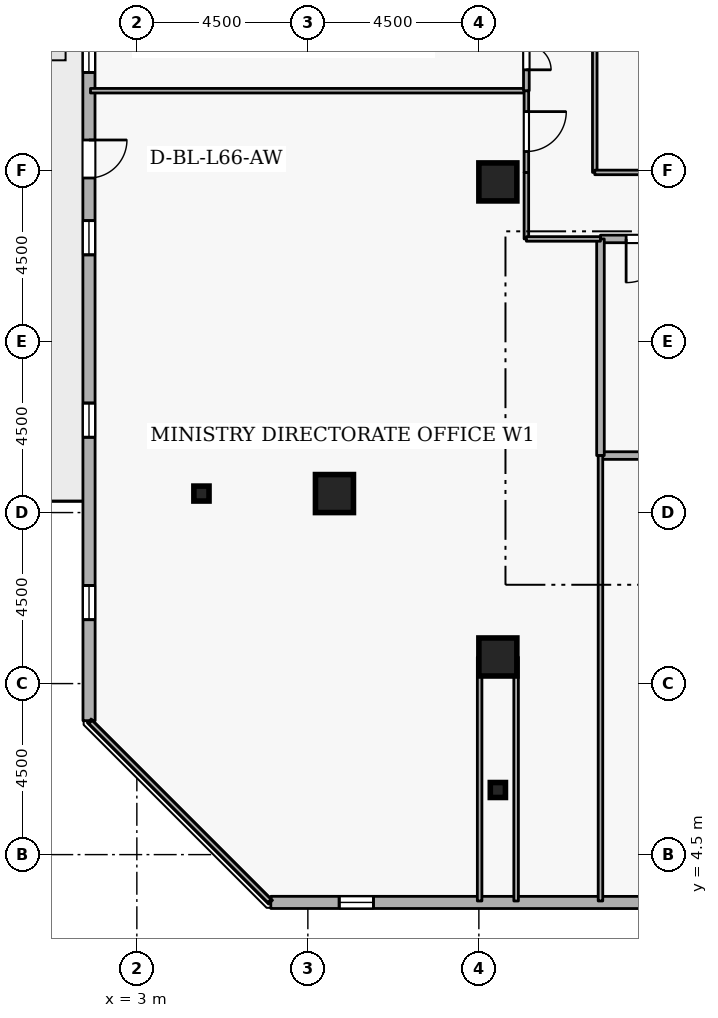
"""IFC4 building model, lengths in metres.
Left out: names, types, materials, properties, quantities, classifications, styles, units other than length and angle.
Written with IfcOpenShell. Run it as: python <this file> out.ifc"""

import sys

from ifc_helpers import new_model, si_unit, direction, frame, frame_2d, origin, origin_2d, place, context, subcontext, project, spatial, rectangle, i_section, extrude, element, fill, save


model = new_model("IFC4")
c1 = context("Model", 3, precision=1e-05, world=origin(), true_north=direction((0.0, 1.0)))
c2 = subcontext(c1, "Body", "Model", "MODEL_VIEW")
j1 = project(units=[si_unit("LENGTHUNIT", "METRE"), si_unit("PLANEANGLEUNIT", "RADIAN")], contexts=[c1])
p1 = place(None, origin())
s1 = spatial("IfcSite", under=j1, at=p1, CompositionType="ELEMENT")
p2 = place(p1, origin())
s2 = spatial("IfcBuilding", under=s1, at=p2, CompositionType="ELEMENT")
p3 = place(p2, frame((0.0, 0.0, 247.5)))
s3 = spatial("IfcBuildingStorey", under=s2, at=p3, CompositionType="ELEMENT", Elevation=247.5)
for number, where, z_axis, x_axis in (
    (1, (12.5, 9.7, 0.0), (0.0, 0.0, 1.0), (1.0, 0.0, 0.0)),
    (2, (8.2, 14.0, 0.0), (0.0, 0.0, 1.0), (1.0, 0.0, 0.0)),
    (3, (12.5, 22.2, 0.0), (0.0, 0.0, 1.0), (1.0, 0.0, 0.0)),
):
    element("IfcColumn", number, at=place(p3, frame(where, z_axis=z_axis, x_axis=x_axis)), inside=s3, PredefinedType="COLUMN", context=c2, shape_type="SweptSolid", body=[
        extrude(rectangle(XDim=1.0, YDim=1.0, at=origin_2d()), origin(), (0.0, 0.0, 1.0), 3.6),
    ])
for number, where, z_axis, x_axis in (
    (4, (12.5, 6.2, 0.0), (0.0, 0.0, 1.0), (1.0, 0.0, 0.0)),
    (5, (4.7, 14.0, 0.0), (0.0, 0.0, 1.0), (1.0, 0.0, 0.0)),
):
    element("IfcColumn", number, at=place(p3, frame(where, z_axis=z_axis, x_axis=x_axis)), inside=s3, PredefinedType="COLUMN", context=c2, shape_type="SweptSolid", body=[
        extrude(i_section(OverallWidth=0.399, OverallDepth=0.394, WebThickness=0.023, FlangeThickness=0.037, FilletRadius=0.015, at=origin_2d()), origin(), (0.0, 0.0, 1.0), 3.6),
    ])
p4 = place(p3, frame((6.525, 3.243, 0.0), z_axis=(0.0, 0.0, 1.0), x_axis=(0.99999997701, -0.000214431216, 0.0)))
e6 = element("IfcWall", 6, at=p4, inside=s3, PredefinedType="STANDARD", context=c2, shape_type="SweptSolid", body=[
    extrude(rectangle(XDim=34.156, YDim=0.32, at=frame_2d((17.078, 0.0))), origin(), (0.0, 0.0, 1.0), 2.7),
])
p5 = place(p4, frame((1.8, 0.0, 0.72)))
e7 = element("IfcOpeningElement", 7, at=p5, cuts=e6, PredefinedType="OPENING", context=c2, shape_type="SweptSolid", body=[
    extrude(rectangle(XDim=0.9, YDim=1.75, at=frame_2d((0.45, 0.875))), frame((0.0, 0.17, 0.0), z_axis=(0.0, -1.0, 0.0), x_axis=(1.0, 0.0, 0.0)), (0.0, 0.0, 1.0), 0.34),
])
p6 = place(p4, frame((11.4, 0.0, 0.72)))
e8 = element("IfcOpeningElement", 8, at=p6, cuts=e6, PredefinedType="OPENING", context=c2, shape_type="SweptSolid", body=[
    extrude(rectangle(XDim=0.9, YDim=1.75, at=frame_2d((0.45, 0.875))), frame((0.0, 0.17, 0.0), z_axis=(0.0, -1.0, 0.0), x_axis=(1.0, 0.0, 0.0)), (0.0, 0.0, 1.0), 0.34),
])
p7 = place(p4, frame((16.2, 0.0, 0.72)))
e9 = element("IfcOpeningElement", 9, at=p7, cuts=e6, PredefinedType="OPENING", context=c2, shape_type="SweptSolid", body=[
    extrude(rectangle(XDim=0.9, YDim=1.75, at=frame_2d((0.45, 0.875))), frame((0.0, 0.17, 0.0), z_axis=(0.0, -1.0, 0.0), x_axis=(1.0, 0.0, 0.0)), (0.0, 0.0, 1.0), 0.34),
])
p8 = place(p4, frame((21.0, 0.0, 0.72)))
e10 = element("IfcOpeningElement", 10, at=p8, cuts=e6, PredefinedType="OPENING", context=c2, shape_type="SweptSolid", body=[
    extrude(rectangle(XDim=0.9, YDim=1.75, at=frame_2d((0.45, 0.875))), frame((0.0, 0.17, 0.0), z_axis=(0.0, -1.0, 0.0), x_axis=(1.0, 0.0, 0.0)), (0.0, 0.0, 1.0), 0.34),
])
p9 = place(p3, frame((1.735, 42.181, 0.0), z_axis=(0.0, 0.0, 1.0), x_axis=(0.000214431216, -0.99999997701, 0.0)))
e11 = element("IfcWall", 11, at=p9, inside=s3, PredefinedType="STANDARD", context=c2, shape_type="SweptSolid", body=[
    extrude(rectangle(XDim=34.156, YDim=0.32, at=frame_2d((17.078, 0.0))), origin(), (0.0, 0.0, 1.0), 2.7),
])
p10 = place(p9, frame((18.878, 0.0, 0.0)))
e12 = element("IfcOpeningElement", 12, at=p10, cuts=e11, PredefinedType="OPENING", context=c2, shape_type="SweptSolid", body=[
    extrude(rectangle(XDim=1.0, YDim=2.08, at=frame_2d((0.5, 1.04))), frame((0.0, 0.17, 0.0), z_axis=(0.0, -1.0, 0.0), x_axis=(1.0, 0.0, 0.0)), (0.0, 0.0, 1.0), 0.34),
])
p11 = place(p9, frame((1.8, 0.0, 0.72)))
e13 = element("IfcOpeningElement", 13, at=p11, cuts=e11, PredefinedType="OPENING", context=c2, shape_type="SweptSolid", body=[
    extrude(rectangle(XDim=0.9, YDim=1.75, at=frame_2d((0.45, 0.875))), frame((0.0, 0.17, 0.0), z_axis=(0.0, -1.0, 0.0), x_axis=(1.0, 0.0, 0.0)), (0.0, 0.0, 1.0), 0.34),
])
p12 = place(p9, frame((6.6, 0.0, 0.72)))
e14 = element("IfcOpeningElement", 14, at=p12, cuts=e11, PredefinedType="OPENING", context=c2, shape_type="SweptSolid", body=[
    extrude(rectangle(XDim=0.9, YDim=1.75, at=frame_2d((0.45, 0.875))), frame((0.0, 0.17, 0.0), z_axis=(0.0, -1.0, 0.0), x_axis=(1.0, 0.0, 0.0)), (0.0, 0.0, 1.0), 0.34),
])
p13 = place(p9, frame((11.4, 0.0, 0.72)))
e15 = element("IfcOpeningElement", 15, at=p13, cuts=e11, PredefinedType="OPENING", context=c2, shape_type="SweptSolid", body=[
    extrude(rectangle(XDim=0.9, YDim=1.75, at=frame_2d((0.45, 0.875))), frame((0.0, 0.17, 0.0), z_axis=(0.0, -1.0, 0.0), x_axis=(1.0, 0.0, 0.0)), (0.0, 0.0, 1.0), 0.34),
])
p14 = place(p9, frame((16.2, 0.0, 0.72)))
e16 = element("IfcOpeningElement", 16, at=p14, cuts=e11, PredefinedType="OPENING", context=c2, shape_type="SweptSolid", body=[
    extrude(rectangle(XDim=0.9, YDim=1.75, at=frame_2d((0.45, 0.875))), frame((0.0, 0.17, 0.0), z_axis=(0.0, -1.0, 0.0), x_axis=(1.0, 0.0, 0.0)), (0.0, 0.0, 1.0), 0.34),
])
p15 = place(p9, frame((21.0, 0.0, 0.72)))
e17 = element("IfcOpeningElement", 17, at=p15, cuts=e11, PredefinedType="OPENING", context=c2, shape_type="SweptSolid", body=[
    extrude(rectangle(XDim=0.9, YDim=1.75, at=frame_2d((0.45, 0.875))), frame((0.0, 0.17, 0.0), z_axis=(0.0, -1.0, 0.0), x_axis=(1.0, 0.0, 0.0)), (0.0, 0.0, 1.0), 0.34),
])
p16 = place(p9, frame((25.8, 0.0, 0.72)))
e18 = element("IfcOpeningElement", 18, at=p16, cuts=e11, PredefinedType="OPENING", context=c2, shape_type="SweptSolid", body=[
    extrude(rectangle(XDim=0.9, YDim=1.75, at=frame_2d((0.45, 0.875))), frame((0.0, 0.17, 0.0), z_axis=(0.0, -1.0, 0.0), x_axis=(1.0, 0.0, 0.0)), (0.0, 0.0, 1.0), 0.34),
])
p17 = place(p9, frame((30.6, 0.0, 0.72)))
e19 = element("IfcOpeningElement", 19, at=p17, cuts=e11, PredefinedType="OPENING", context=c2, shape_type="SweptSolid", body=[
    extrude(rectangle(XDim=0.9, YDim=1.75, at=frame_2d((0.45, 0.875))), frame((0.0, 0.17, 0.0), z_axis=(0.0, -1.0, 0.0), x_axis=(1.0, 0.0, 0.0)), (0.0, 0.0, 1.0), 0.34),
])
p18 = place(p3, frame((15.2, 15.0, 0.0), z_axis=(0.0, 0.0, 1.0), x_axis=(1.0, 0.0, 0.0)))
e20 = element("IfcWall", 20, at=p18, inside=s3, PredefinedType="STANDARD", context=c2, shape_type="SweptSolid", body=[
    extrude(rectangle(XDim=2.5, YDim=0.2, at=frame_2d((1.25, 0.0))), origin(), (0.0, 0.0, 1.0), 3.34),
])
p19 = place(p3, frame((17.7, 20.7, 0.0), z_axis=(0.0, 0.0, 1.0), x_axis=(-1.0, 0.0, 0.0)))
e21 = element("IfcWall", 21, at=p19, inside=s3, PredefinedType="STANDARD", context=c2, shape_type="SweptSolid", body=[
    extrude(rectangle(XDim=2.5, YDim=0.2, at=frame_2d((1.25, 0.0))), origin(), (0.0, 0.0, 1.0), 3.34),
])
p20 = place(p19, frame((0.675, 0.0, 0.0)))
e22 = element("IfcOpeningElement", 22, at=p20, cuts=e21, PredefinedType="OPENING", context=c2, shape_type="SweptSolid", body=[
    extrude(rectangle(XDim=1.15, YDim=2.1, at=frame_2d((0.575, 1.05))), frame((0.0, 0.11, 0.0), z_axis=(0.0, -1.0, 0.0), x_axis=(1.0, 0.0, 0.0)), (0.0, 0.0, 1.0), 0.22),
])
p21 = place(p3, frame((15.2, 20.7, 0.0), z_axis=(0.0, 0.0, 1.0), x_axis=(0.0, -1.0, 0.0)))
e23 = element("IfcWall", 23, at=p21, inside=s3, PredefinedType="STANDARD", context=c2, shape_type="SweptSolid", body=[
    extrude(rectangle(XDim=5.7, YDim=0.2, at=frame_2d((2.85, 0.0))), origin(), (0.0, 0.0, 1.0), 3.34),
])
p22 = place(p3, frame((13.25, 22.45, 0.0), z_axis=(0.0, 0.0, 1.0), x_axis=(0.0, -1.0, 0.0)))
e24 = element("IfcWall", 24, at=p22, inside=s3, PredefinedType="PARTITIONING", context=c2, shape_type="SweptSolid", body=[
    extrude(rectangle(XDim=1.75, YDim=0.12, at=frame_2d((0.875, 0.0))), origin(), (0.0, 0.0, 1.0), 3.34),
])
p23 = place(p3, frame((13.25, 20.7, 0.0), z_axis=(0.0, 0.0, 1.0), x_axis=(1.0, 0.0, 0.0)))
e25 = element("IfcWall", 25, at=p23, inside=s3, PredefinedType="PARTITIONING", context=c2, shape_type="SweptSolid", body=[
    extrude(rectangle(XDim=1.95, YDim=0.12, at=frame_2d((0.975, 0.0))), origin(), (0.0, 0.0, 1.0), 3.34),
])
p24 = place(p3, frame((15.2, 15.0, 0.0), z_axis=(0.0, 0.0, 1.0), x_axis=(0.0, -1.0, 0.0)))
e26 = element("IfcWall", 26, at=p24, inside=s3, PredefinedType="PARTITIONING", context=c2, shape_type="SweptSolid", body=[
    extrude(rectangle(XDim=11.72, YDim=0.12, at=frame_2d((5.86, 0.0))), origin(), (0.0, 0.0, 1.0), 3.34),
])
p25 = place(p3, frame((12.98, 3.28, 0.0), z_axis=(0.0, 0.0, 1.0), x_axis=(0.0, 1.0, 0.0)))
e27 = element("IfcWall", 27, at=p25, inside=s3, PredefinedType="PARTITIONING", context=c2, shape_type="SweptSolid", body=[
    extrude(rectangle(XDim=6.42, YDim=0.12, at=frame_2d((3.21, 0.0))), origin(), (0.0, 0.0, 1.0), 3.34),
])
p26 = place(p3, frame((12.02, 9.7, 0.0), z_axis=(0.0, 0.0, 1.0), x_axis=(0.0, -1.0, 0.0)))
e28 = element("IfcWall", 28, at=p26, inside=s3, PredefinedType="PARTITIONING", context=c2, shape_type="SweptSolid", body=[
    extrude(rectangle(XDim=6.42, YDim=0.12, at=frame_2d((3.21, 0.0))), origin(), (0.0, 0.0, 1.0), 2.895),
])
p27 = place(p3, frame((6.49, 3.28, 0.0), z_axis=(0.0, 0.0, 1.0), x_axis=(-0.707106781187, 0.707106781187, 0.0)))
e29 = element("IfcWall", 29, at=p27, inside=s3, PredefinedType="PARTITIONING", context=c2, shape_type="SweptSolid", body=[
    extrude(rectangle(XDim=6.66, YDim=0.12, at=frame_2d((3.33, 0.0))), origin(), (0.0, 0.0, 1.0), 3.34),
])
p28 = place(p3, frame((1.78, 24.6, 0.0), z_axis=(0.0, 0.0, 1.0), x_axis=(1.0, 0.0, 0.0)))
e30 = element("IfcWall", 30, at=p28, inside=s3, PredefinedType="PARTITIONING", context=c2, shape_type="SweptSolid", body=[
    extrude(rectangle(XDim=11.47, YDim=0.12, at=frame_2d((5.735, 0.0))), origin(), (0.0, 0.0, 1.0), 3.34),
])
p29 = place(p3, frame((13.25, 24.6, 0.0), z_axis=(0.0, 0.0, 1.0), x_axis=(0.0, -1.0, 0.0)))
e31 = element("IfcWall", 31, at=p29, inside=s3, PredefinedType="PARTITIONING", context=c2, shape_type="SweptSolid", body=[
    extrude(rectangle(XDim=2.15, YDim=0.12, at=frame_2d((1.075, 0.0))), origin(), (0.0, 0.0, 1.0), 3.34),
])
p30 = place(p29, frame((0.55, 0.0, 0.0)))
e32 = element("IfcOpeningElement", 32, at=p30, cuts=e31, PredefinedType="OPENING", context=c2, shape_type="SweptSolid", body=[
    extrude(rectangle(XDim=1.05, YDim=2.1, at=frame_2d((0.525, 1.05))), frame((0.0, 0.07, 0.0), z_axis=(0.0, -1.0, 0.0), x_axis=(1.0, 0.0, 0.0)), (0.0, 0.0, 1.0), 0.14),
])
p31 = place(p3, frame((13.25, 27.0, 0.0), z_axis=(0.0, 0.0, 1.0), x_axis=(0.0, -1.0, 0.0)))
e33 = element("IfcWall", 33, at=p31, inside=s3, PredefinedType="PARTITIONING", context=c2, shape_type="SweptSolid", body=[
    extrude(rectangle(XDim=2.4, YDim=0.15, at=frame_2d((1.2, 0.0))), origin(), (0.0, 0.0, 1.0), 3.34),
])
p32 = place(p31, frame((0.55, 0.0, 0.0)))
e34 = element("IfcOpeningElement", 34, at=p32, cuts=e33, PredefinedType="OPENING", context=c2, shape_type="SweptSolid", body=[
    extrude(rectangle(XDim=1.3, YDim=2.12, at=frame_2d((0.65, 1.06))), frame((0.0, 0.085, 0.0), z_axis=(0.0, -1.0, 0.0), x_axis=(1.0, 0.0, 0.0)), (0.0, 0.0, 1.0), 0.17),
])
p33 = place(p3, frame((15.05, 22.45, 0.0), z_axis=(0.0, 0.0, 1.0), x_axis=(0.0, 1.0, 0.0)))
e35 = element("IfcWall", 35, at=p33, inside=s3, PredefinedType="PARTITIONING", context=c2, shape_type="SweptSolid", body=[
    extrude(rectangle(XDim=3.75, YDim=0.12, at=frame_2d((1.875, 0.0))), origin(), (0.0, 0.0, 1.0), 3.34),
])
p34 = place(p3, frame((20.9, 22.45, 0.0), z_axis=(0.0, 0.0, 1.0), x_axis=(-1.0, 0.0, 0.0)))
e36 = element("IfcWall", 36, at=p34, inside=s3, PredefinedType="PARTITIONING", context=c2, shape_type="SweptSolid", body=[
    extrude(rectangle(XDim=5.85, YDim=0.12, at=frame_2d((2.925, 0.0))), origin(), (0.0, 0.0, 1.0), 3.34),
])
p35 = place(p34, frame((2.45, 0.0, 0.0)))
e37 = element("IfcOpeningElement", 37, at=p35, cuts=e36, PredefinedType="OPENING", context=c2, shape_type="SweptSolid", body=[
    extrude(rectangle(XDim=0.95, YDim=2.1, at=frame_2d((0.475, 1.05))), frame((0.0, 0.07, 0.0), z_axis=(0.0, -1.0, 0.0), x_axis=(1.0, 0.0, 0.0)), (0.0, 0.0, 1.0), 0.14),
])
p36 = place(p5, origin())
e38 = element("IfcWindow", 38, at=p36, inside=s3, PartitioningType="SINGLE_PANEL", PredefinedType="WINDOW", context=c2, shape_type="SweptSolid", body=[
    extrude(rectangle(XDim=0.9, YDim=1.75, at=frame_2d((0.45, 0.875))), frame((0.0, 0.03, 0.0), z_axis=(0.0, -1.0, 0.0), x_axis=(1.0, 0.0, 0.0)), (0.0, 0.0, 1.0), 0.06),
])
fill(e7, e38)
p37 = place(p10, origin())
e39 = element("IfcDoor", 39, at=p37, inside=s3, OperationType="SINGLE_SWING_LEFT", PredefinedType="DOOR", context=c2, shape_type="SweptSolid", body=[
    extrude(rectangle(XDim=1.0, YDim=2.08, at=frame_2d((0.5, 1.04))), frame((0.0, 0.025, 0.0), z_axis=(0.0, -1.0, 0.0), x_axis=(1.0, 0.0, 0.0)), (0.0, 0.0, 1.0), 0.05),
])
fill(e12, e39)
p38 = place(p14, origin())
e40 = element("IfcWindow", 40, at=p38, inside=s3, PartitioningType="SINGLE_PANEL", PredefinedType="WINDOW", context=c2, shape_type="SweptSolid", body=[
    extrude(rectangle(XDim=0.9, YDim=1.75, at=frame_2d((0.45, 0.875))), frame((0.0, 0.03, 0.0), z_axis=(0.0, -1.0, 0.0), x_axis=(1.0, 0.0, 0.0)), (0.0, 0.0, 1.0), 0.06),
])
fill(e16, e40)
p39 = place(p15, origin())
e41 = element("IfcWindow", 41, at=p39, inside=s3, PartitioningType="SINGLE_PANEL", PredefinedType="WINDOW", context=c2, shape_type="SweptSolid", body=[
    extrude(rectangle(XDim=0.9, YDim=1.75, at=frame_2d((0.45, 0.875))), frame((0.0, 0.03, 0.0), z_axis=(0.0, -1.0, 0.0), x_axis=(1.0, 0.0, 0.0)), (0.0, 0.0, 1.0), 0.06),
])
fill(e17, e41)
p40 = place(p16, origin())
e42 = element("IfcWindow", 42, at=p40, inside=s3, PartitioningType="SINGLE_PANEL", PredefinedType="WINDOW", context=c2, shape_type="SweptSolid", body=[
    extrude(rectangle(XDim=0.9, YDim=1.75, at=frame_2d((0.45, 0.875))), frame((0.0, 0.03, 0.0), z_axis=(0.0, -1.0, 0.0), x_axis=(1.0, 0.0, 0.0)), (0.0, 0.0, 1.0), 0.06),
])
fill(e18, e42)
p41 = place(p17, origin())
e43 = element("IfcWindow", 43, at=p41, inside=s3, PartitioningType="SINGLE_PANEL", PredefinedType="WINDOW", context=c2, shape_type="SweptSolid", body=[
    extrude(rectangle(XDim=0.9, YDim=1.75, at=frame_2d((0.45, 0.875))), frame((0.0, 0.03, 0.0), z_axis=(0.0, -1.0, 0.0), x_axis=(1.0, 0.0, 0.0)), (0.0, 0.0, 1.0), 0.06),
])
fill(e19, e43)
p42 = place(p20, origin())
e44 = element("IfcDoor", 44, at=p42, inside=s3, OperationType="SINGLE_SWING_RIGHT", PredefinedType="DOOR", context=c2, shape_type="SweptSolid", body=[
    extrude(rectangle(XDim=1.15, YDim=2.1, at=frame_2d((0.575, 1.05))), frame((0.0, 0.025, 0.0), z_axis=(0.0, -1.0, 0.0), x_axis=(1.0, 0.0, 0.0)), (0.0, 0.0, 1.0), 0.05),
])
fill(e22, e44)
p43 = place(p30, origin())
e45 = element("IfcDoor", 45, at=p43, inside=s3, OperationType="SINGLE_SWING_LEFT", PredefinedType="DOOR", context=c2, shape_type="SweptSolid", body=[
    extrude(rectangle(XDim=1.05, YDim=2.1, at=frame_2d((0.525, 1.05))), frame((0.0, 0.025, 0.0), z_axis=(0.0, -1.0, 0.0), x_axis=(1.0, 0.0, 0.0)), (0.0, 0.0, 1.0), 0.05),
])
fill(e32, e45)
p44 = place(p32, origin())
e46 = element("IfcDoor", 46, at=p44, inside=s3, OperationType="DOUBLE_DOOR_SINGLE_SWING", PredefinedType="DOOR", context=c2, shape_type="SweptSolid", body=[
    extrude(rectangle(XDim=1.3, YDim=2.12, at=frame_2d((0.65, 1.06))), frame((0.0, 0.025, 0.0), z_axis=(0.0, -1.0, 0.0), x_axis=(1.0, 0.0, 0.0)), (0.0, 0.0, 1.0), 0.05),
])
fill(e34, e46)
save(model, sys.argv[1])
